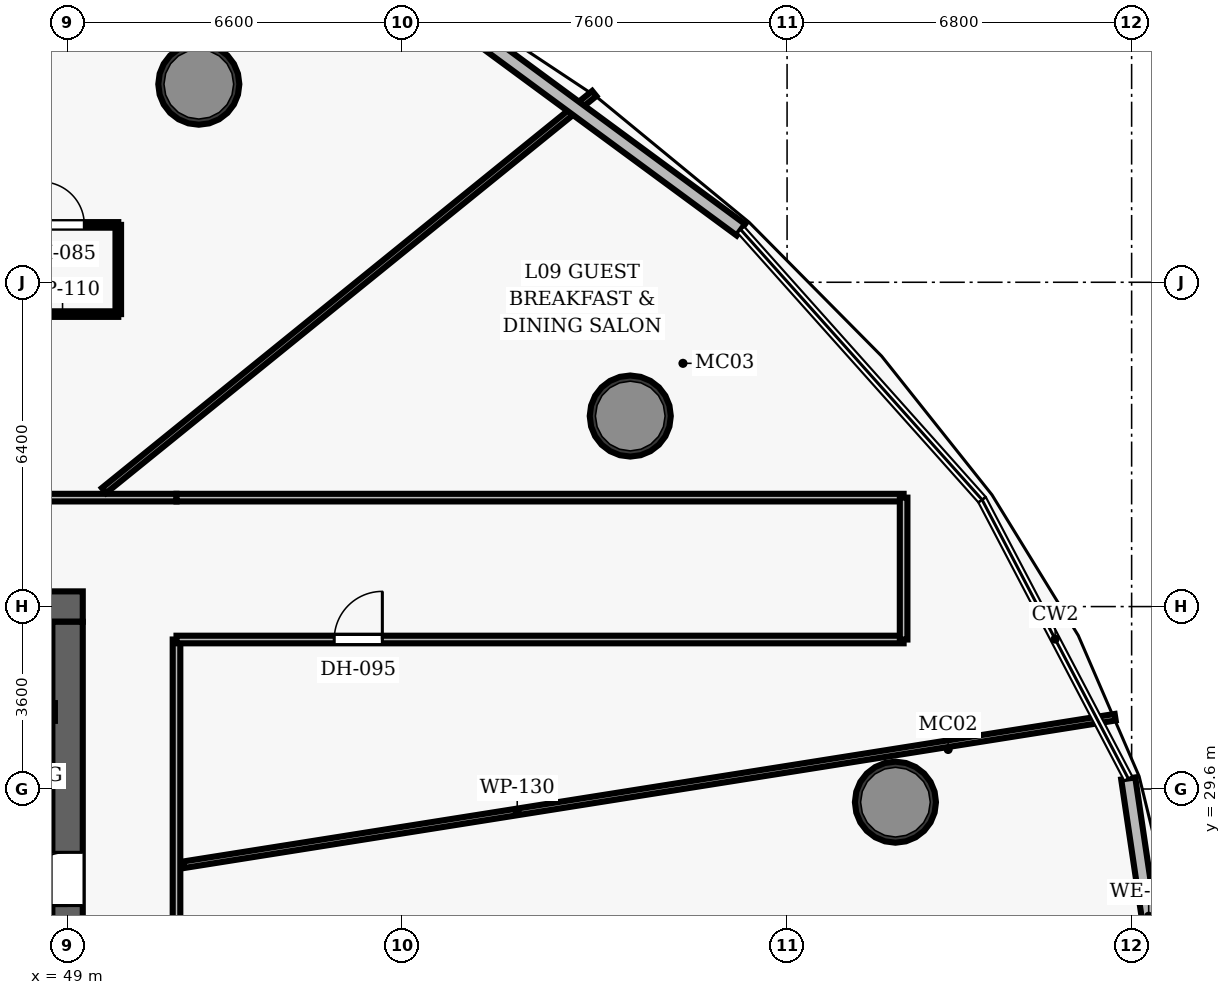
"""IFC4 building model, lengths in metres.
Left out: names, types, materials, properties, quantities, classifications, styles, units other than length and angle.
Written with IfcOpenShell. Run it as: python <this file> out.ifc"""

import sys

from ifc_helpers import new_model, si_unit, direction, frame, frame_2d, origin, origin_2d, place, context, subcontext, project, spatial, rectangle, hollow_circle, extrude, element, fill, save


model = new_model("IFC4")
c1 = context("Model", 3, precision=1e-05, world=origin(), true_north=direction((0.0, 1.0)))
c2 = subcontext(c1, "Body", "Model", "MODEL_VIEW")
j1 = project(units=[si_unit("LENGTHUNIT", "METRE"), si_unit("PLANEANGLEUNIT", "RADIAN")], contexts=[c1])
p1 = place(None, origin())
s1 = spatial("IfcSite", under=j1, at=p1, CompositionType="ELEMENT")
p2 = place(p1, origin())
s2 = spatial("IfcBuilding", under=s1, at=p2, CompositionType="ELEMENT")
p3 = place(p2, frame((0.0, 0.0, 48.4)))
s3 = spatial("IfcBuildingStorey", under=s2, at=p3, CompositionType="ELEMENT", Elevation=48.4)
p4 = place(p3, frame((26.7, 33.2, 0.0), z_axis=(0.0, 0.0, 1.0), x_axis=(1.0, 0.0, 0.0)))
e1 = element("IfcWall", 1, at=p4, inside=s3, PredefinedType="SHEAR", context=c2, shape_type="SweptSolid", body=[
    extrude(rectangle(XDim=22.6, YDim=0.6, at=frame_2d((11.3, 0.0))), origin(), (0.0, 0.0, 1.0), 3.5),
])
p5 = place(p4, frame((4.62, 0.0, 0.0)))
e2 = element("IfcOpeningElement", 2, at=p5, cuts=e1, PredefinedType="OPENING", context=c2, shape_type="SweptSolid", body=[
    extrude(rectangle(XDim=1.05, YDim=2.15, at=frame_2d((0.525, 1.075))), frame((0.0, 0.31, 0.0), z_axis=(0.0, -1.0, 0.0), x_axis=(1.0, 0.0, 0.0)), (0.0, 0.0, 1.0), 0.62),
])
p6 = place(p4, frame((14.52, 0.0, 0.0)))
e3 = element("IfcOpeningElement", 3, at=p6, cuts=e1, PredefinedType="OPENING", context=c2, shape_type="SweptSolid", body=[
    extrude(rectangle(XDim=1.05, YDim=2.15, at=frame_2d((0.525, 1.075))), frame((0.0, 0.31, 0.0), z_axis=(0.0, -1.0, 0.0), x_axis=(1.0, 0.0, 0.0)), (0.0, 0.0, 1.0), 0.62),
])
p7 = place(p3, frame((49.0, 19.1, 0.0), z_axis=(0.0, 0.0, 1.0), x_axis=(0.0, 1.0, 0.0)))
e4 = element("IfcWall", 4, at=p7, inside=s3, PredefinedType="SHEAR", context=c2, shape_type="SweptSolid", body=[
    extrude(rectangle(XDim=13.8, YDim=0.6, at=frame_2d((6.9, 0.0))), origin(), (0.0, 0.0, 1.0), 3.5),
])
p8 = place(p7, frame((8.2, 0.0, 0.0)))
e5 = element("IfcOpeningElement", 5, at=p8, cuts=e4, PredefinedType="OPENING", context=c2, shape_type="SweptSolid", body=[
    extrude(rectangle(XDim=1.05, YDim=2.15, at=frame_2d((0.525, 1.075))), frame((0.0, 0.31, 0.0), z_axis=(0.0, -1.0, 0.0), x_axis=(1.0, 0.0, 0.0)), (0.0, 0.0, 1.0), 0.62),
])
for number, where, z_axis, x_axis in (
    (6, (65.339, 29.34, 0.0), (0.0, 0.0, 1.0), (1.0, 0.0, 0.0)),
    (7, (60.105, 36.96, 0.0), (0.0, 0.0, 1.0), (1.0, 0.0, 0.0)),
    (8, (51.59, 43.509, 0.0), (0.0, 0.0, 1.0), (1.0, 0.0, 0.0)),
):
    element("IfcColumn", number, at=place(p3, frame(where, z_axis=z_axis, x_axis=x_axis)), inside=s3, PredefinedType="COLUMN", context=c2, shape_type="SweptSolid", body=[
        extrude(hollow_circle(Radius=0.8, WallThickness=0.06, at=origin_2d()), origin(), (0.0, 0.0, 1.0), 3.5),
    ])
p9 = place(p3, frame((45.08, 31.12, 0.0), z_axis=(0.0, 0.0, 1.0), x_axis=(1.0, 0.0, 0.0)))
e9 = element("IfcWall", 9, at=p9, inside=s3, PredefinedType="SHEAR", context=c2, shape_type="SweptSolid", body=[
    extrude(rectangle(XDim=3.67, YDim=0.35, at=frame_2d((1.835, 0.0))), origin(), (0.0, 0.0, 1.0), 2.6),
])
p10 = place(p9, frame((1.25, 0.0, 0.0)))
e10 = element("IfcOpeningElement", 10, at=p10, cuts=e9, PredefinedType="OPENING", context=c2, shape_type="SweptSolid", body=[
    extrude(rectangle(XDim=1.1, YDim=2.15, at=frame_2d((0.55, 1.075))), frame((0.0, 0.185, 0.0), z_axis=(0.0, -1.0, 0.0), x_axis=(1.0, 0.0, 0.0)), (0.0, 0.0, 1.0), 0.37),
])
p11 = place(p3, frame((27.65, 35.35, 0.0), z_axis=(0.0, 0.0, 1.0), x_axis=(1.0, 0.0, 0.0)))
e11 = element("IfcWall", 11, at=p11, inside=s3, PredefinedType="PARTITIONING", context=c2, shape_type="SweptSolid", body=[
    extrude(rectangle(XDim=23.5, YDim=0.15, at=frame_2d((11.75, 0.0))), origin(), (0.0, 0.0, 1.0), 2.6),
])
p12 = place(p11, frame((15.393, 0.0, 0.0)))
e12 = element("IfcOpeningElement", 12, at=p12, cuts=e11, PredefinedType="OPENING", context=c2, shape_type="SweptSolid", body=[
    extrude(rectangle(XDim=0.95, YDim=2.15, at=frame_2d((0.475, 1.075))), frame((0.0, 0.085, 0.0), z_axis=(0.0, -1.0, 0.0), x_axis=(1.0, 0.0, 0.0)), (0.0, 0.0, 1.0), 0.17),
])
p13 = place(p11, frame((9.511, 0.0, 0.0)))
e13 = element("IfcOpeningElement", 13, at=p13, cuts=e11, PredefinedType="OPENING", context=c2, shape_type="SweptSolid", body=[
    extrude(rectangle(XDim=0.95, YDim=2.15, at=frame_2d((0.475, 1.075))), frame((0.0, 0.085, 0.0), z_axis=(0.0, -1.0, 0.0), x_axis=(1.0, 0.0, 0.0)), (0.0, 0.0, 1.0), 0.17),
])
p14 = place(p11, frame((6.977, 0.0, 0.0)))
e14 = element("IfcOpeningElement", 14, at=p14, cuts=e11, PredefinedType="OPENING", context=c2, shape_type="SweptSolid", body=[
    extrude(rectangle(XDim=0.95, YDim=2.15, at=frame_2d((0.475, 1.075))), frame((0.0, 0.085, 0.0), z_axis=(0.0, -1.0, 0.0), x_axis=(1.0, 0.0, 0.0)), (0.0, 0.0, 1.0), 0.17),
])
p15 = place(p3, frame((51.15, 16.65, 0.0), z_axis=(0.0, 0.0, 1.0), x_axis=(0.0, 1.0, 0.0)))
e15 = element("IfcWall", 15, at=p15, inside=s3, PredefinedType="PARTITIONING", context=c2, shape_type="SweptSolid", body=[
    extrude(rectangle(XDim=15.9, YDim=0.15, at=frame_2d((7.95, 0.0))), origin(), (0.0, 0.0, 1.0), 2.6),
])
p16 = place(p15, frame((2.484, 0.0, 0.0)))
e16 = element("IfcOpeningElement", 16, at=p16, cuts=e15, PredefinedType="OPENING", context=c2, shape_type="SweptSolid", body=[
    extrude(rectangle(XDim=0.95, YDim=2.15, at=frame_2d((0.475, 1.075))), frame((0.0, 0.085, 0.0), z_axis=(0.0, -1.0, 0.0), x_axis=(1.0, 0.0, 0.0)), (0.0, 0.0, 1.0), 0.17),
])
p17 = place(p15, frame((7.379, 0.0, 0.0)))
e17 = element("IfcOpeningElement", 17, at=p17, cuts=e15, PredefinedType="OPENING", context=c2, shape_type="SweptSolid", body=[
    extrude(rectangle(XDim=0.95, YDim=2.15, at=frame_2d((0.475, 1.075))), frame((0.0, 0.085, 0.0), z_axis=(0.0, -1.0, 0.0), x_axis=(1.0, 0.0, 0.0)), (0.0, 0.0, 1.0), 0.17),
])
p18 = place(p3, frame((51.15, 35.35, 0.0), z_axis=(0.0, 0.0, 1.0), x_axis=(1.0, 0.0, 0.0)))
e18 = element("IfcWall", 18, at=p18, inside=s3, PredefinedType="PARTITIONING", context=c2, shape_type="SweptSolid", body=[
    extrude(rectangle(XDim=14.35, YDim=0.15, at=frame_2d((7.175, 0.0))), origin(), (0.0, 0.0, 1.0), 2.6),
])
p19 = place(p3, frame((51.15, 32.55, 0.0), z_axis=(0.0, 0.0, 1.0), x_axis=(1.0, 0.0, 0.0)))
e19 = element("IfcWall", 19, at=p19, inside=s3, PredefinedType="PARTITIONING", context=c2, shape_type="SweptSolid", body=[
    extrude(rectangle(XDim=14.35, YDim=0.15, at=frame_2d((7.175, 0.0))), origin(), (0.0, 0.0, 1.0), 2.6),
])
p20 = place(p19, frame((3.113, 0.0, 0.0)))
e20 = element("IfcOpeningElement", 20, at=p20, cuts=e19, PredefinedType="OPENING", context=c2, shape_type="SweptSolid", body=[
    extrude(rectangle(XDim=0.95, YDim=2.15, at=frame_2d((0.475, 1.075))), frame((0.0, 0.085, 0.0), z_axis=(0.0, -1.0, 0.0), x_axis=(1.0, 0.0, 0.0)), (0.0, 0.0, 1.0), 0.17),
])
p21 = place(p3, frame((65.5, 32.55, 0.0), z_axis=(0.0, 0.0, 1.0), x_axis=(0.0, 1.0, 0.0)))
e21 = element("IfcWall", 21, at=p21, inside=s3, PredefinedType="PARTITIONING", context=c2, shape_type="SweptSolid", body=[
    extrude(rectangle(XDim=2.8, YDim=0.15, at=frame_2d((1.4, 0.0))), origin(), (0.0, 0.0, 1.0), 2.6),
])
p22 = place(p3, frame((51.29, 28.105, 0.0), z_axis=(0.0, 0.0, 1.0), x_axis=(0.987689587694, 0.156426590965, 0.0)))
e22 = element("IfcWall", 22, at=p22, inside=s3, PredefinedType="PARTITIONING", context=c2, shape_type="SweptSolid", body=[
    extrude(rectangle(XDim=18.615, YDim=0.13, at=frame_2d((9.308, 0.0))), origin(), (0.0, 0.0, 1.0), 2.6),
])
p23 = place(p3, frame((49.719, 35.49, 0.0), z_axis=(0.0, 0.0, 1.0), x_axis=(0.777145304008, 0.62932120293, 0.0)))
e23 = element("IfcWall", 23, at=p23, inside=s3, PredefinedType="PARTITIONING", context=c2, shape_type="SweptSolid", body=[
    extrude(rectangle(XDim=12.449, YDim=0.13, at=frame_2d((6.225, 0.0))), origin(), (0.0, 0.0, 1.0), 2.6),
])
p24 = place(p3, frame((47.801, 38.972, 0.0), z_axis=(0.0, 0.0, 1.0), x_axis=(1.0, 0.0, 0.0)))
e24 = element("IfcWall", 24, at=p24, inside=s3, PredefinedType="PARTITIONING", context=c2, shape_type="SweptSolid", body=[
    extrude(rectangle(XDim=2.2, YDim=0.11, at=frame_2d((1.1, 0.0))), origin(), (0.0, 0.0, 1.0), 2.6),
])
p25 = place(p3, frame((47.801, 40.732, 0.0), z_axis=(0.0, 0.0, 1.0), x_axis=(1.0, 0.0, 0.0)))
e25 = element("IfcWall", 25, at=p25, inside=s3, PredefinedType="PARTITIONING", context=c2, shape_type="SweptSolid", body=[
    extrude(rectangle(XDim=2.2, YDim=0.11, at=frame_2d((1.1, 0.0))), origin(), (0.0, 0.0, 1.0), 2.6),
])
p26 = place(p25, frame((0.68, 0.0, 0.0)))
e26 = element("IfcOpeningElement", 26, at=p26, cuts=e25, PredefinedType="OPENING", context=c2, shape_type="SweptSolid", body=[
    extrude(rectangle(XDim=0.85, YDim=2.1, at=frame_2d((0.425, 1.05))), frame((0.0, 0.065, 0.0), z_axis=(0.0, -1.0, 0.0), x_axis=(1.0, 0.0, 0.0)), (0.0, 0.0, 1.0), 0.13),
])
p27 = place(p3, frame((50.001, 38.972, 0.0), z_axis=(0.0, 0.0, 1.0), x_axis=(0.0, 1.0, 0.0)))
e27 = element("IfcWall", 27, at=p27, inside=s3, PredefinedType="PARTITIONING", context=c2, shape_type="SweptSolid", body=[
    extrude(rectangle(XDim=1.76, YDim=0.11, at=frame_2d((0.88, 0.0))), origin(), (0.0, 0.0, 1.0), 2.6),
])
p28 = place(p3, frame((69.933, 29.808, 0.0), z_axis=(0.0, 0.0, 1.0), x_axis=(0.146728919415, -0.989176740632, 0.0)))
e28 = element("IfcWall", 28, at=p28, inside=s3, PredefinedType="SOLIDWALL", context=c2, shape_type="SweptSolid", body=[
    extrude(rectangle(XDim=5.498, YDim=0.28, at=frame_2d((2.749, 0.0))), origin(), (0.0, 0.0, 1.0), 3.25),
])
p29 = place(p3, frame((55.971, 45.287, 0.0), z_axis=(0.0, 0.0, 1.0), x_axis=(0.805234930247, -0.592955906547, 0.0)))
e29 = element("IfcWall", 29, at=p29, inside=s3, PredefinedType="SOLIDWALL", context=c2, shape_type="SweptSolid", body=[
    extrude(rectangle(XDim=7.845, YDim=0.28, at=frame_2d((3.922, 0.0))), origin(), (0.0, 0.0, 1.0), 3.25),
])
p30 = place(p8, origin())
e30 = element("IfcDoor", 30, at=p30, inside=s3, OperationType="SINGLE_SWING_LEFT", PredefinedType="DOOR", context=c2, shape_type="SweptSolid", body=[
    extrude(rectangle(XDim=1.05, YDim=2.15, at=frame_2d((0.525, 1.075))), frame((0.0, 0.025, 0.0), z_axis=(0.0, -1.0, 0.0), x_axis=(1.0, 0.0, 0.0)), (0.0, 0.0, 1.0), 0.05),
])
fill(e5, e30)
p31 = place(p20, origin())
e31 = element("IfcDoor", 31, at=p31, inside=s3, OperationType="SINGLE_SWING_RIGHT", PredefinedType="DOOR", context=c2, shape_type="SweptSolid", body=[
    extrude(rectangle(XDim=0.95, YDim=2.15, at=frame_2d((0.475, 1.075))), frame((0.0, 0.025, 0.0), z_axis=(0.0, -1.0, 0.0), x_axis=(1.0, 0.0, 0.0)), (0.0, 0.0, 1.0), 0.05),
])
fill(e20, e31)
p32 = place(p26, origin())
e32 = element("IfcDoor", 32, at=p32, inside=s3, OperationType="SINGLE_SWING_LEFT", PredefinedType="DOOR", context=c2, shape_type="SweptSolid", body=[
    extrude(rectangle(XDim=0.85, YDim=2.1, at=frame_2d((0.425, 1.05))), frame((0.0, 0.025, 0.0), z_axis=(0.0, -1.0, 0.0), x_axis=(1.0, 0.0, 0.0)), (0.0, 0.0, 1.0), 0.05),
])
fill(e26, e32)
save(model, sys.argv[1])
